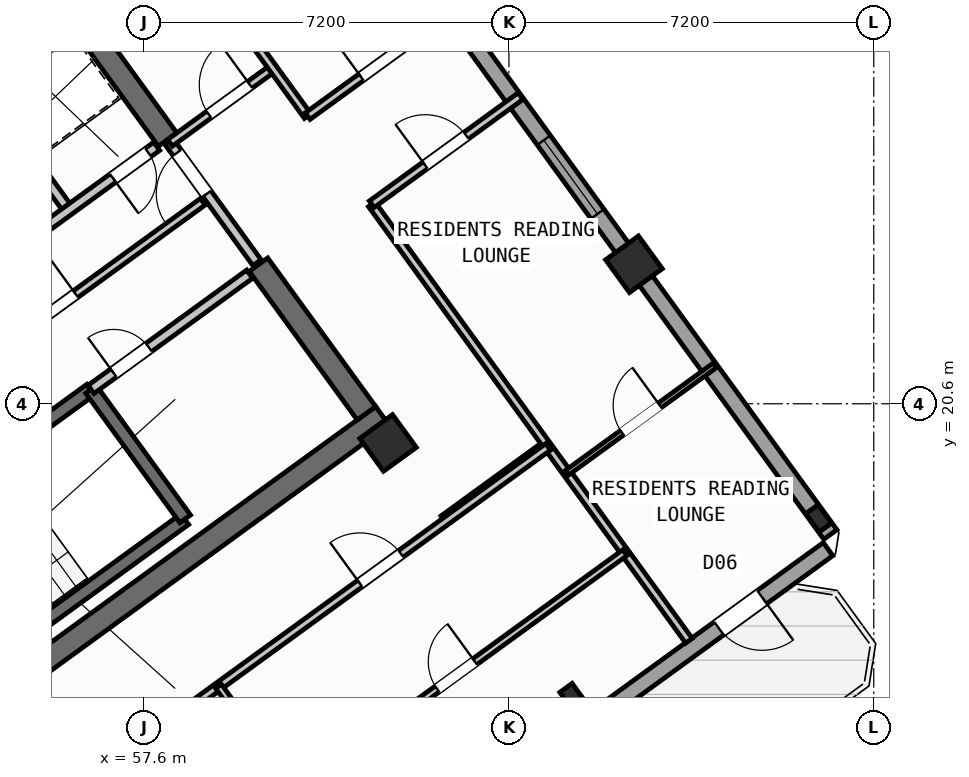
"""IFC4 building model, lengths in metres.
Left out: names, types, materials, properties, quantities, classifications, styles, units other than length and angle.
Written with IfcOpenShell. Run it as: python <this file> out.ifc"""

import sys

from ifc_helpers import new_model, si_unit, direction, frame, frame_2d, origin, origin_2d, place, context, subcontext, project, spatial, rectangle, hollow_rectangle, i_section, extrude, source, transform, mapped, element, fill, save


model = new_model("IFC4")
c1 = context("Model", 3, precision=1e-05, world=origin(), true_north=direction((0.0, 1.0)))
c2 = subcontext(c1, "Body", "Model", "MODEL_VIEW")
j1 = project(units=[si_unit("LENGTHUNIT", "METRE"), si_unit("PLANEANGLEUNIT", "RADIAN")], contexts=[c1])
p1 = place(None, origin())
s1 = spatial("IfcSite", under=j1, at=p1, CompositionType="ELEMENT")
p2 = place(p1, origin())
s2 = spatial("IfcBuilding", under=s1, at=p2, CompositionType="ELEMENT")
p3 = place(p2, frame((0.0, 0.0, 233.7)))
s3 = spatial("IfcBuildingStorey", under=s2, at=p3, CompositionType="ELEMENT", Elevation=233.7)
p4 = place(p3, frame((52.399, 13.169, 0.0), z_axis=(0.0, 0.0, 1.0), x_axis=(0.809022352778, 0.587777877013, 0.0)))
e1 = element("IfcWall", 1, at=p4, inside=s3, PredefinedType="SHEAR", context=c2, shape_type="SweptSolid", body=[
    extrude(rectangle(XDim=12.24, YDim=0.45, at=frame_2d((6.12, 0.0))), origin(), (0.0, 0.0, 1.0), 4.55),
])
p5 = place(p3, frame((61.988, 20.413, 0.0), z_axis=(0.0, 0.0, 1.0), x_axis=(-0.587819244441, 0.808992296542, 0.0)))
e2 = element("IfcWall", 2, at=p5, inside=s3, PredefinedType="SHEAR", context=c2, shape_type="SweptSolid", body=[
    extrude(rectangle(XDim=3.625, YDim=0.45, at=frame_2d((1.812, 0.0))), origin(), (0.0, 0.0, 1.0), 4.55),
])
p6 = place(p3, frame((58.064, 25.813, 0.0), z_axis=(0.0, 0.0, 1.0), x_axis=(-0.587774812919, 0.809024578921, 0.0)))
e3 = element("IfcWall", 3, at=p6, inside=s3, PredefinedType="SHEAR", context=c2, shape_type="SweptSolid", body=[
    extrude(rectangle(XDim=6.475, YDim=0.45, at=frame_2d((3.238, 0.0))), origin(), (0.0, 0.0, 1.0), 4.55),
])
m1 = source(origin(), c2, "Body", "SweptSolid", [
    extrude(i_section(OverallWidth=0.3, OverallDepth=0.45, WebThickness=0.014, FlangeThickness=0.026, at=origin_2d()), origin(), (0.0, 0.0, 1.0), 4.8),
])
p7 = place(p3, frame((66.058, 14.811, 0.0), z_axis=(0.0, 0.0, 1.0), x_axis=(0.809016994375, 0.587785252292, 0.0)))
e4 = element("IfcColumn", 4, at=p7, inside=s3, PredefinedType="COLUMN", context=c2, shape_type="MappedRepresentation", body=[
    mapped(m1, transform((0.0, 0.0, 0.0), scale=1.0)),
])
m2 = source(origin(), c2, "Body", "SweptSolid", [
    extrude(hollow_rectangle(XDim=0.8, YDim=0.8, WallThickness=0.032, at=origin_2d()), origin(), (0.0, 0.0, 1.0), 4.8),
])
p8 = place(p3, frame((62.414, 19.827, 0.0), z_axis=(0.0, 0.0, 1.0), x_axis=(0.809016994375, 0.587785252292, 0.0)))
e5 = element("IfcColumn", 5, at=p8, inside=s3, PredefinedType="COLUMN", context=c2, shape_type="MappedRepresentation", body=[
    mapped(m2, transform((0.0, 0.0, 0.0), scale=1.0)),
])
p9 = place(p3, frame((70.912, 18.338, 0.0), z_axis=(0.0, 0.0, 1.0), x_axis=(0.809016994375, 0.587785252292, 0.0)))
e6 = element("IfcColumn", 6, at=p9, inside=s3, PredefinedType="COLUMN", context=c2, shape_type="MappedRepresentation", body=[
    mapped(m1, transform((0.0, 0.0, 0.0), scale=1.0)),
])
p10 = place(p3, frame((67.268, 23.354, 0.0), z_axis=(0.0, 0.0, 1.0), x_axis=(0.809016994375, 0.587785252292, 0.0)))
e7 = element("IfcColumn", 7, at=p10, inside=s3, PredefinedType="COLUMN", context=c2, shape_type="MappedRepresentation", body=[
    mapped(m2, transform((0.0, 0.0, 0.0), scale=1.0)),
])
p11 = place(p3, frame((43.938, 25.192, 0.0), z_axis=(0.0, 0.0, 1.0), x_axis=(0.809016324578, 0.587786174187, 0.0)))
e8 = element("IfcWall", 8, at=p11, inside=s3, PredefinedType="STANDARD", context=c2, shape_type="SweptSolid", body=[
    extrude(rectangle(XDim=17.587, YDim=0.32, at=frame_2d((8.794, 0.0))), origin(), (0.0, 0.0, 1.0), 4.55),
])
p12 = place(p11, frame((14.914, 0.0, 0.0)))
e9 = element("IfcOpeningElement", 9, at=p12, cuts=e8, PredefinedType="OPENING", context=c2, shape_type="SweptSolid", body=[
    extrude(rectangle(XDim=1.05, YDim=2.15, at=frame_2d((0.525, 1.075))), frame((0.0, 0.17, 0.0), z_axis=(0.0, -1.0, 0.0), x_axis=(1.0, 0.0, 0.0)), (0.0, 0.0, 1.0), 0.34),
])
p13 = place(p11, frame((1.969, 0.0, 0.75)))
e10 = element("IfcOpeningElement", 10, at=p13, cuts=e8, PredefinedType="OPENING", context=c2, shape_type="SweptSolid", body=[
    extrude(rectangle(XDim=2.4, YDim=1.6, at=frame_2d((1.2, 0.8))), frame((0.0, 0.17, 0.0), z_axis=(0.0, -1.0, 0.0), x_axis=(1.0, 0.0, 0.0)), (0.0, 0.0, 1.0), 0.34),
])
p14 = place(p11, frame((7.219, 0.0, 0.75)))
e11 = element("IfcOpeningElement", 11, at=p14, cuts=e8, PredefinedType="OPENING", context=c2, shape_type="SweptSolid", body=[
    extrude(rectangle(XDim=2.4, YDim=1.6, at=frame_2d((1.2, 0.8))), frame((0.0, 0.17, 0.0), z_axis=(0.0, -1.0, 0.0), x_axis=(1.0, 0.0, 0.0)), (0.0, 0.0, 1.0), 0.34),
])
p15 = place(p3, frame((58.455, 35.484, 0.0), z_axis=(0.0, 0.0, 1.0), x_axis=(0.587783625747, -0.809018176127, 0.0)))
e12 = element("IfcWall", 12, at=p15, inside=s3, PredefinedType="STANDARD", context=c2, shape_type="SweptSolid", body=[
    extrude(rectangle(XDim=21.587, YDim=0.32, at=frame_2d((10.794, 0.0))), origin(), (0.0, 0.0, 1.0), 4.075),
])
p16 = place(p15, frame((2.844, 0.0, 0.75)))
e13 = element("IfcOpeningElement", 13, at=p16, cuts=e12, PredefinedType="OPENING", context=c2, shape_type="SweptSolid", body=[
    extrude(rectangle(XDim=2.4, YDim=1.6, at=frame_2d((1.2, 0.8))), frame((0.0, 0.17, 0.0), z_axis=(0.0, -1.0, 0.0), x_axis=(1.0, 0.0, 0.0)), (0.0, 0.0, 1.0), 0.34),
])
p17 = place(p15, frame((11.967, 0.0, 0.85)))
e14 = element("IfcOpeningElement", 14, at=p17, cuts=e12, PredefinedType="OPENING", context=c2, shape_type="SweptSolid", body=[
    extrude(rectangle(XDim=1.8, YDim=1.5, at=frame_2d((0.9, 0.75))), frame((0.0, 0.17, 0.0), z_axis=(0.0, -1.0, 0.0), x_axis=(1.0, 0.0, 0.0)), (0.0, 0.0, 1.0), 0.34),
])
p18 = place(p3, frame((71.098, 17.731, 0.0), z_axis=(0.0, 0.0, 1.0), x_axis=(-0.809021120468, -0.587779573171, 0.0)))
e15 = element("IfcWall", 15, at=p18, inside=s3, PredefinedType="STANDARD", context=c2, shape_type="SweptSolid", body=[
    extrude(rectangle(XDim=17.588, YDim=0.32, at=frame_2d((8.794, 0.0))), origin(), (0.0, 0.0, 1.0), 4.55),
])
p19 = place(p18, frame((1.611, 0.0, 0.0)))
e16 = element("IfcOpeningElement", 16, at=p19, cuts=e15, PredefinedType="OPENING", context=c2, shape_type="SweptSolid", body=[
    extrude(rectangle(XDim=1.05, YDim=2.15, at=frame_2d((0.525, 1.075))), frame((0.0, 0.17, 0.0), z_axis=(0.0, -1.0, 0.0), x_axis=(1.0, 0.0, 0.0)), (0.0, 0.0, 1.0), 0.34),
])
p20 = place(p18, frame((8.456, 0.0, 0.75)))
e17 = element("IfcOpeningElement", 17, at=p20, cuts=e15, PredefinedType="OPENING", context=c2, shape_type="SweptSolid", body=[
    extrude(rectangle(XDim=2.4, YDim=1.6, at=frame_2d((1.2, 0.8))), frame((0.0, 0.17, 0.0), z_axis=(0.0, -1.0, 0.0), x_axis=(1.0, 0.0, 0.0)), (0.0, 0.0, 1.0), 0.34),
])
p21 = place(p18, frame((12.731, 0.0, 0.75)))
e18 = element("IfcOpeningElement", 18, at=p21, cuts=e15, PredefinedType="OPENING", context=c2, shape_type="SweptSolid", body=[
    extrude(rectangle(XDim=2.4, YDim=1.6, at=frame_2d((1.2, 0.8))), frame((0.0, 0.17, 0.0), z_axis=(0.0, -1.0, 0.0), x_axis=(1.0, 0.0, 0.0)), (0.0, 0.0, 1.0), 0.34),
])
p22 = place(p3, frame((49.863, 23.44, 0.0), z_axis=(0.0, 0.0, 1.0), x_axis=(0.809003474932, 0.587803859759, 0.0)))
e19 = element("IfcWall", 19, at=p22, inside=s3, PredefinedType="SHEAR", context=c2, shape_type="SweptSolid", body=[
    extrude(rectangle(XDim=7.46, YDim=0.26, at=frame_2d((3.73, 0.0))), origin(), (0.0, 0.0, 1.0), 4.55),
])
p23 = place(p22, frame((0.36, 0.0, 0.0)))
e20 = element("IfcOpeningElement", 20, at=p23, cuts=e19, PredefinedType="OPENING", context=c2, shape_type="SweptSolid", body=[
    extrude(rectangle(XDim=0.86, YDim=2.05, at=frame_2d((0.43, 1.025))), frame((0.0, 0.14, 0.0), z_axis=(0.0, -1.0, 0.0), x_axis=(1.0, 0.0, 0.0)), (0.0, 0.0, 1.0), 0.28),
])
p24 = place(p3, frame((52.472, 14.013, 0.0), z_axis=(0.0, 0.0, 1.0), x_axis=(0.809028366311, 0.587769599847, 0.0)))
e21 = element("IfcWall", 21, at=p24, inside=s3, PredefinedType="SHEAR", context=c2, shape_type="SweptSolid", body=[
    extrude(rectangle(XDim=7.33, YDim=0.26, at=frame_2d((3.665, 0.0))), origin(), (0.0, 0.0, 1.0), 4.55),
])
p25 = place(p3, frame((50.615, 16.57, 0.0), z_axis=(0.0, 0.0, 1.0), x_axis=(0.809028366311, 0.587769599847, 0.0)))
e22 = element("IfcWall", 22, at=p25, inside=s3, PredefinedType="SHEAR", context=c2, shape_type="SweptSolid", body=[
    extrude(rectangle(XDim=7.33, YDim=0.26, at=frame_2d((3.665, 0.0))), origin(), (0.0, 0.0, 1.0), 4.55),
])
p26 = place(p25, frame((0.22, 0.0, 0.0)))
e23 = element("IfcOpeningElement", 23, at=p26, cuts=e22, PredefinedType="OPENING", context=c2, shape_type="SweptSolid", body=[
    extrude(rectangle(XDim=1.1, YDim=2.1, at=frame_2d((0.55, 1.05))), frame((0.0, 0.14, 0.0), z_axis=(0.0, -1.0, 0.0), x_axis=(1.0, 0.0, 0.0)), (0.0, 0.0, 1.0), 0.28),
])
p27 = place(p3, frame((58.41, 18.327, 0.0), z_axis=(0.0, 0.0, 1.0), x_axis=(-0.58776738483, 0.809029975545, 0.0)))
e24 = element("IfcWall", 24, at=p27, inside=s3, PredefinedType="SHEAR", context=c2, shape_type="SweptSolid", body=[
    extrude(rectangle(XDim=3.16, YDim=0.26, at=frame_2d((1.58, 0.0))), origin(), (0.0, 0.0, 1.0), 4.55),
])
p28 = place(p3, frame((56.553, 20.884, 0.0), z_axis=(0.0, 0.0, 1.0), x_axis=(0.809041669066, 0.587751288995, 0.0)))
e25 = element("IfcWall", 25, at=p28, inside=s3, PredefinedType="STANDARD", context=c2, shape_type="SweptSolid", body=[
    extrude(rectangle(XDim=3.868, YDim=0.2, at=frame_2d((1.934, 0.0))), origin(), (0.0, 0.0, 1.0), 4.54),
])
p29 = place(p28, frame((0.55, 0.0, 0.0)))
e26 = element("IfcOpeningElement", 26, at=p29, cuts=e25, PredefinedType="OPENING", context=c2, shape_type="SweptSolid", body=[
    extrude(rectangle(XDim=0.86, YDim=2.05, at=frame_2d((0.43, 1.025))), frame((0.0, 0.11, 0.0), z_axis=(0.0, -1.0, 0.0), x_axis=(1.0, 0.0, 0.0)), (0.0, 0.0, 1.0), 0.22),
])
p30 = place(p3, frame((54.421, 21.436, 0.0), z_axis=(0.0, 0.0, 1.0), x_axis=(0.809013710463, 0.587789772183, 0.0)))
e27 = element("IfcWall", 27, at=p30, inside=s3, PredefinedType="PARTITIONING", context=c2, shape_type="SweptSolid", body=[
    extrude(rectangle(XDim=5.36, YDim=0.16, at=frame_2d((2.68, 0.0))), origin(), (0.0, 0.0, 1.0), 4.54),
])
p31 = place(p30, frame((1.4, 0.0, 0.0)))
e28 = element("IfcOpeningElement", 28, at=p31, cuts=e27, PredefinedType="OPENING", context=c2, shape_type="SweptSolid", body=[
    extrude(rectangle(XDim=0.86, YDim=2.05, at=frame_2d((0.43, 1.025))), frame((0.0, 0.09, 0.0), z_axis=(0.0, -1.0, 0.0), x_axis=(1.0, 0.0, 0.0)), (0.0, 0.0, 1.0), 0.18),
])
p32 = place(p3, frame((56.111, 24.419, 0.0), z_axis=(0.0, 0.0, 1.0), x_axis=(-0.58777848983, 0.809021907548, 0.0)))
e29 = element("IfcWall", 29, at=p32, inside=s3, PredefinedType="STANDARD", context=c2, shape_type="SweptSolid", body=[
    extrude(rectangle(XDim=2.88, YDim=0.2, at=frame_2d((1.44, 0.0))), origin(), (0.0, 0.0, 1.0), 4.54),
])
p33 = place(p3, frame((53.425, 22.468, 0.0), z_axis=(0.0, 0.0, 1.0), x_axis=(0.809015945709, 0.587786695655, 0.0)))
e30 = element("IfcWall", 30, at=p33, inside=s3, PredefinedType="STANDARD", context=c2, shape_type="SweptSolid", body=[
    extrude(rectangle(XDim=5.468, YDim=0.2, at=frame_2d((2.734, 0.0))), origin(), (0.0, 0.0, 1.0), 4.54),
])
p34 = place(p33, frame((4.4, 0.0, 0.0)))
e31 = element("IfcOpeningElement", 31, at=p34, cuts=e30, PredefinedType="OPENING", context=c2, shape_type="SweptSolid", body=[
    extrude(rectangle(XDim=0.86, YDim=2.05, at=frame_2d((0.43, 1.025))), frame((0.0, 0.11, 0.0), z_axis=(0.0, -1.0, 0.0), x_axis=(1.0, 0.0, 0.0)), (0.0, 0.0, 1.0), 0.22),
])
p35 = place(p33, frame((0.35, 0.0, 0.0)))
e32 = element("IfcOpeningElement", 32, at=p35, cuts=e30, PredefinedType="OPENING", context=c2, shape_type="SweptSolid", body=[
    extrude(rectangle(XDim=0.86, YDim=2.05, at=frame_2d((0.43, 1.025))), frame((0.0, 0.11, 0.0), z_axis=(0.0, -1.0, 0.0), x_axis=(1.0, 0.0, 0.0)), (0.0, 0.0, 1.0), 0.22),
])
p36 = place(p3, frame((59.827, 23.386, 0.0), z_axis=(0.0, 0.0, 1.0), x_axis=(-0.587803840107, 0.809003489211, 0.0)))
e33 = element("IfcWall", 33, at=p36, inside=s3, PredefinedType="STANDARD", context=c2, shape_type="SweptSolid", body=[
    extrude(rectangle(XDim=2.96, YDim=0.2, at=frame_2d((1.48, 0.0))), origin(), (0.0, 0.0, 1.0), 4.54),
])
p37 = place(p36, frame((1.68, 0.0, 0.0)))
e34 = element("IfcOpeningElement", 34, at=p37, cuts=e33, PredefinedType="OPENING", context=c2, shape_type="SweptSolid", body=[
    extrude(rectangle(XDim=1.0, YDim=2.1, at=frame_2d((0.5, 1.05))), frame((0.0, 0.11, 0.0), z_axis=(0.0, -1.0, 0.0), x_axis=(1.0, 0.0, 0.0)), (0.0, 0.0, 1.0), 0.22),
])
p38 = place(p3, frame((63.507, 18.322, 0.0), z_axis=(0.0, 0.0, 1.0), x_axis=(0.809034604122, 0.587761013791, 0.0)))
e35 = element("IfcWall", 35, at=p38, inside=s3, PredefinedType="PARTITIONING", context=c2, shape_type="SweptSolid", body=[
    extrude(rectangle(XDim=2.51, YDim=0.16, at=frame_2d((1.255, 0.0))), origin(), (0.0, 0.0, 1.0), 4.54),
])
p39 = place(p3, frame((58.111, 25.749, 0.0), z_axis=(0.0, 0.0, 1.0), x_axis=(0.809000999347, 0.58780726693, 0.0)))
e36 = element("IfcWall", 36, at=p39, inside=s3, PredefinedType="PARTITIONING", context=c2, shape_type="SweptSolid", body=[
    extrude(rectangle(XDim=2.51, YDim=0.16, at=frame_2d((1.255, 0.0))), origin(), (0.0, 0.0, 1.0), 4.075),
])
p40 = place(p39, frame((0.95, 0.0, 0.0)))
e37 = element("IfcOpeningElement", 37, at=p40, cuts=e36, PredefinedType="OPENING", context=c2, shape_type="SweptSolid", body=[
    extrude(rectangle(XDim=1.0, YDim=2.1, at=frame_2d((0.5, 1.05))), frame((0.0, 0.09, 0.0), z_axis=(0.0, -1.0, 0.0), x_axis=(1.0, 0.0, 0.0)), (0.0, 0.0, 1.0), 0.18),
])
p41 = place(p3, frame((68.353, 15.922, 0.0), z_axis=(0.0, 0.0, 1.0), x_axis=(-0.587783168305, 0.809018508476, 0.0)))
e38 = element("IfcWall", 38, at=p41, inside=s3, PredefinedType="PARTITIONING", context=c2, shape_type="SweptSolid", body=[
    extrude(rectangle(XDim=10.65, YDim=0.16, at=frame_2d((5.325, 0.0))), origin(), (0.0, 0.0, 1.0), 4.54),
])
p42 = place(p3, frame((60.829, 26.278, 0.0), z_axis=(0.0, 0.0, 1.0), x_axis=(-0.587781800813, 0.80901950201, 0.0)))
e39 = element("IfcWall", 39, at=p42, inside=s3, PredefinedType="PARTITIONING", context=c2, shape_type="SweptSolid", body=[
    extrude(rectangle(XDim=8.9, YDim=0.16, at=frame_2d((4.45, 0.0))), origin(), (0.0, 0.0, 1.0), 4.54),
])
p43 = place(p3, frame((62.093, 24.538, 0.0), z_axis=(0.0, 0.0, 1.0), x_axis=(0.809035546126, 0.58775971715, 0.0)))
e40 = element("IfcWall", 40, at=p43, inside=s3, PredefinedType="PARTITIONING", context=c2, shape_type="SweptSolid", body=[
    extrude(rectangle(XDim=3.63, YDim=0.16, at=frame_2d((1.815, 0.0))), origin(), (0.0, 0.0, 1.0), 4.54),
])
p44 = place(p43, frame((1.305, 0.0, 0.0)))
e41 = element("IfcOpeningElement", 41, at=p44, cuts=e40, PredefinedType="OPENING", context=c2, shape_type="SweptSolid", body=[
    extrude(rectangle(XDim=1.0, YDim=2.1, at=frame_2d((0.5, 1.05))), frame((0.0, 0.09, 0.0), z_axis=(0.0, -1.0, 0.0), x_axis=(1.0, 0.0, 0.0)), (0.0, 0.0, 1.0), 0.18),
])
p45 = place(p3, frame((60.829, 26.278, 0.0), z_axis=(0.0, 0.0, 1.0), x_axis=(0.809003564202, 0.587803736896, 0.0)))
e42 = element("IfcWall", 42, at=p45, inside=s3, PredefinedType="PARTITIONING", context=c2, shape_type="SweptSolid", body=[
    extrude(rectangle(XDim=3.63, YDim=0.16, at=frame_2d((1.815, 0.0))), origin(), (0.0, 0.0, 1.0), 4.54),
])
p46 = place(p45, frame((1.305, 0.0, 0.0)))
e43 = element("IfcOpeningElement", 43, at=p46, cuts=e42, PredefinedType="OPENING", context=c2, shape_type="SweptSolid", body=[
    extrude(rectangle(XDim=1.0, YDim=2.1, at=frame_2d((0.5, 1.05))), frame((0.0, 0.09, 0.0), z_axis=(0.0, -1.0, 0.0), x_axis=(1.0, 0.0, 0.0)), (0.0, 0.0, 1.0), 0.18),
])
p47 = place(p3, frame((65.944, 19.238, 0.0), z_axis=(0.0, 0.0, 1.0), x_axis=(0.809013833588, 0.587789602718, 0.0)))
e44 = element("IfcWall", 44, at=p47, inside=s3, PredefinedType="PARTITIONING", context=c2, shape_type="SweptSolid", body=[
    extrude(rectangle(XDim=3.61, YDim=0.11, at=frame_2d((1.805, 0.0))), origin(), (0.0, 0.0, 1.0), 4.54),
])
p48 = place(p47, frame((1.345, 0.0, 0.0)))
e45 = element("IfcOpeningElement", 45, at=p48, cuts=e44, PredefinedType="OPENING", context=c2, shape_type="SweptSolid", body=[
    extrude(rectangle(XDim=0.92, YDim=2.08, at=frame_2d((0.46, 1.04))), frame((0.0, 0.065, 0.0), z_axis=(0.0, -1.0, 0.0), x_axis=(1.0, 0.0, 0.0)), (0.0, 0.0, 1.0), 0.13),
])
p49 = place(p3, frame((53.705, 11.126, 0.0), z_axis=(0.0, 0.0, 1.0), x_axis=(0.809014504436, 0.587788679384, 0.0)))
e46 = element("IfcWall", 46, at=p49, inside=s3, PredefinedType="PARTITIONING", context=c2, shape_type="SweptSolid", body=[
    extrude(rectangle(XDim=14.67, YDim=0.16, at=frame_2d((7.335, 0.0))), origin(), (0.0, 0.0, 1.0), 4.54),
])
p50 = place(p49, frame((10.08, 0.0, 0.0)))
e47 = element("IfcOpeningElement", 47, at=p50, cuts=e46, PredefinedType="OPENING", context=c2, shape_type="SweptSolid", body=[
    extrude(rectangle(XDim=1.0, YDim=2.1, at=frame_2d((0.5, 1.05))), frame((0.0, 0.09, 0.0), z_axis=(0.0, -1.0, 0.0), x_axis=(1.0, 0.0, 0.0)), (0.0, 0.0, 1.0), 0.18),
])
p51 = place(p3, frame((56.249, 9.785, 0.0), z_axis=(0.0, 0.0, 1.0), x_axis=(0.809011747655, 0.587792473715, 0.0)))
e48 = element("IfcWall", 48, at=p51, inside=s3, PredefinedType="PLUMBINGWALL", context=c2, shape_type="SweptSolid", body=[
    extrude(rectangle(XDim=13.4, YDim=0.14, at=frame_2d((6.7, 0.0))), origin(), (0.0, 0.0, 1.0), 4.54),
])
p52 = place(p51, frame((8.82, 0.0, 0.0)))
e49 = element("IfcOpeningElement", 49, at=p52, cuts=e48, PredefinedType="OPENING", context=c2, shape_type="SweptSolid", body=[
    extrude(rectangle(XDim=0.92, YDim=2.08, at=frame_2d((0.46, 1.04))), frame((0.0, 0.08, 0.0), z_axis=(0.0, -1.0, 0.0), x_axis=(1.0, 0.0, 0.0)), (0.0, 0.0, 1.0), 0.16),
])
p53 = place(p3, frame((60.585, 12.936, 0.0), z_axis=(0.0, 0.0, 1.0), x_axis=(-0.587772116736, 0.809026537752, 0.0)))
e50 = element("IfcWall", 50, at=p53, inside=s3, PredefinedType="PLUMBINGWALL", context=c2, shape_type="SweptSolid", body=[
    extrude(rectangle(XDim=2.58, YDim=0.14, at=frame_2d((1.29, 0.0))), origin(), (0.0, 0.0, 1.0), 4.54),
])
p54 = place(p53, frame((0.9, 0.0, 0.0)))
e51 = element("IfcOpeningElement", 51, at=p54, cuts=e50, PredefinedType="OPENING", context=c2, shape_type="SweptSolid", body=[
    extrude(rectangle(XDim=0.78, YDim=2.05, at=frame_2d((0.39, 1.025))), frame((0.0, 0.08, 0.0), z_axis=(0.0, -1.0, 0.0), x_axis=(1.0, 0.0, 0.0)), (0.0, 0.0, 1.0), 0.16),
])
m3 = source(origin(), c2, "Body", "SweptSolid", [
    extrude(rectangle(XDim=1.05, YDim=2.15, at=frame_2d((0.525, 1.075))), frame((0.0, 0.025, 0.0), z_axis=(0.0, -1.0, 0.0), x_axis=(1.0, 0.0, 0.0)), (0.0, 0.0, 1.0), 0.05),
])
p55 = place(p19, origin())
e52 = element("IfcDoor", 52, at=p55, inside=s3, OperationType="SINGLE_SWING_LEFT", PredefinedType="DOOR", context=c2, shape_type="MappedRepresentation", body=[
    mapped(m3, transform((0.0, 0.0, 0.0), scale=1.0)),
])
fill(e16, e52)
m4 = source(origin(), c2, "Body", "SweptSolid", [
    extrude(rectangle(XDim=1.8, YDim=1.5, at=frame_2d((0.9, 0.75))), frame((0.0, 0.03, 0.0), z_axis=(0.0, -1.0, 0.0), x_axis=(1.0, 0.0, 0.0)), (0.0, 0.0, 1.0), 0.06),
])
p56 = place(p17, origin())
e53 = element("IfcWindow", 53, at=p56, inside=s3, PartitioningType="SINGLE_PANEL", PredefinedType="WINDOW", context=c2, shape_type="MappedRepresentation", body=[
    mapped(m4, transform((0.0, 0.0, 0.0), scale=1.0)),
])
fill(e14, e53)
m5 = source(origin(), c2, "Body", "SweptSolid", [
    extrude(rectangle(XDim=0.86, YDim=2.05, at=frame_2d((0.43, 1.025))), frame((0.0, 0.025, 0.0), z_axis=(0.0, -1.0, 0.0), x_axis=(1.0, 0.0, 0.0)), (0.0, 0.0, 1.0), 0.05),
])
p57 = place(p31, origin())
e54 = element("IfcDoor", 54, at=p57, inside=s3, OperationType="SINGLE_SWING_RIGHT", PredefinedType="DOOR", context=c2, shape_type="MappedRepresentation", body=[
    mapped(m5, transform((0.0, 0.0, 0.0), scale=1.0)),
])
fill(e28, e54)
p58 = place(p29, origin())
e55 = element("IfcDoor", 55, at=p58, inside=s3, OperationType="SINGLE_SWING_LEFT", PredefinedType="DOOR", context=c2, shape_type="MappedRepresentation", body=[
    mapped(m5, transform((0.0, 0.0, 0.0), scale=1.0)),
])
fill(e26, e55)
p59 = place(p34, frame((0.86, 0.0, 0.0), z_axis=(0.0, 0.0, 1.0), x_axis=(-1.0, 0.0, 0.0)))
e56 = element("IfcDoor", 56, at=p59, inside=s3, OperationType="SINGLE_SWING_RIGHT", PredefinedType="DOOR", context=c2, shape_type="MappedRepresentation", body=[
    mapped(m5, transform((0.0, 0.0, 0.0), scale=1.0)),
])
fill(e31, e56)
m6 = source(origin(), c2, "Body", "SweptSolid", [
    extrude(rectangle(XDim=1.0, YDim=2.1, at=frame_2d((0.5, 1.05))), frame((0.0, 0.025, 0.0), z_axis=(0.0, -1.0, 0.0), x_axis=(1.0, 0.0, 0.0)), (0.0, 0.0, 1.0), 0.05),
])
p60 = place(p40, origin())
e57 = element("IfcDoor", 57, at=p60, inside=s3, OperationType="SINGLE_SWING_RIGHT", PredefinedType="DOOR", context=c2, shape_type="MappedRepresentation", body=[
    mapped(m6, transform((0.0, 0.0, 0.0), scale=1.0)),
])
fill(e37, e57)
p61 = place(p37, origin())
e58 = element("IfcDoor", 58, at=p61, inside=s3, OperationType="SINGLE_SWING_LEFT", PredefinedType="DOOR", context=c2, shape_type="MappedRepresentation", body=[
    mapped(m6, transform((0.0, 0.0, 0.0), scale=1.0)),
])
fill(e34, e58)
p62 = place(p46, origin())
e59 = element("IfcDoor", 59, at=p62, inside=s3, OperationType="SINGLE_SWING_LEFT", PredefinedType="DOOR", context=c2, shape_type="MappedRepresentation", body=[
    mapped(m6, transform((0.0, 0.0, 0.0), scale=1.0)),
])
fill(e43, e59)
p63 = place(p44, origin())
e60 = element("IfcDoor", 60, at=p63, inside=s3, OperationType="SINGLE_SWING_LEFT", PredefinedType="DOOR", context=c2, shape_type="MappedRepresentation", body=[
    mapped(m6, transform((0.0, 0.0, 0.0), scale=1.0)),
])
fill(e41, e60)
m7 = source(origin(), c2, "Body", "SweptSolid", [
    extrude(rectangle(XDim=0.92, YDim=2.08, at=frame_2d((0.46, 1.04))), frame((0.0, 0.025, 0.0), z_axis=(0.0, -1.0, 0.0), x_axis=(1.0, 0.0, 0.0)), (0.0, 0.0, 1.0), 0.05),
])
p64 = place(p48, origin())
e61 = element("IfcDoor", 61, at=p64, inside=s3, OperationType="SINGLE_SWING_RIGHT", PredefinedType="DOOR", context=c2, shape_type="MappedRepresentation", body=[
    mapped(m7, transform((0.0, 0.0, 0.0), scale=1.0)),
])
fill(e45, e61)
p65 = place(p50, origin())
e62 = element("IfcDoor", 62, at=p65, inside=s3, OperationType="SINGLE_SWING_LEFT", PredefinedType="DOOR", context=c2, shape_type="MappedRepresentation", body=[
    mapped(m6, transform((0.0, 0.0, 0.0), scale=1.0)),
])
fill(e47, e62)
p66 = place(p52, origin())
e63 = element("IfcDoor", 63, at=p66, inside=s3, OperationType="SINGLE_SWING_RIGHT", PredefinedType="DOOR", context=c2, shape_type="MappedRepresentation", body=[
    mapped(m7, transform((0.0, 0.0, 0.0), scale=1.0)),
])
fill(e49, e63)
save(model, sys.argv[1])
